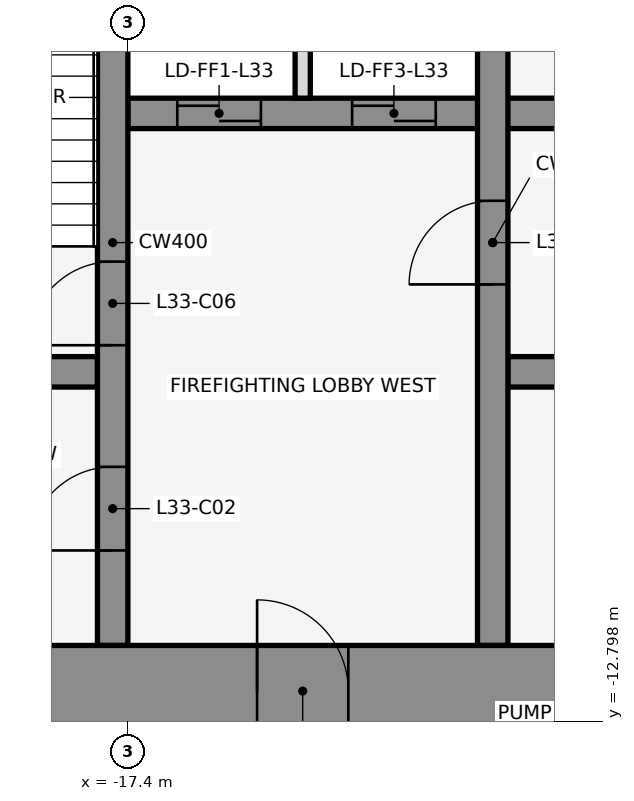
"""IFC4 building model, lengths in metres.
Left out: names, types, materials, properties, quantities, classifications, styles, units other than length and angle.
Written with IfcOpenShell. Run it as: python <this file> out.ifc"""

import sys

from ifc_helpers import new_model, si_unit, direction, frame, frame_2d, origin, place, context, subcontext, project, spatial, rectangle, extrude, element, fill, save


model = new_model("IFC4")
c1 = context("Model", 3, precision=1e-05, world=origin(), true_north=direction((0.0, 1.0)))
c2 = subcontext(c1, "Body", "Model", "MODEL_VIEW")
j1 = project(units=[si_unit("LENGTHUNIT", "METRE"), si_unit("PLANEANGLEUNIT", "RADIAN")], contexts=[c1])
p1 = place(None, origin())
s1 = spatial("IfcSite", under=j1, at=p1, CompositionType="ELEMENT")
p2 = place(p1, origin())
s2 = spatial("IfcBuilding", under=s1, at=p2, CompositionType="ELEMENT")
p3 = place(p2, frame((0.0, 0.0, 152.7)))
s3 = spatial("IfcBuildingStorey", under=s2, at=p3, CompositionType="ELEMENT", Elevation=152.7)
p4 = place(p3, frame((-20.8, -8.2, 0.0), z_axis=(0.0, 0.0, 1.0), x_axis=(1.0, 0.0, 0.0)))
e1 = element("IfcWall", 1, at=p4, inside=s3, PredefinedType="SHEAR", context=c2, shape_type="SweptSolid", body=[
    extrude(rectangle(XDim=3.0, YDim=0.4, at=frame_2d((1.5, 0.0))), origin(), (0.0, 0.0, 1.0), 4.1),
])
p5 = place(p4, frame((0.85, 0.0, 0.0)))
e2 = element("IfcOpeningElement", 2, at=p5, cuts=e1, PredefinedType="OPENING", context=c2, shape_type="SweptSolid", body=[
    extrude(rectangle(XDim=1.2, YDim=2.1, at=frame_2d((0.6, 1.05))), frame((0.0, 0.212, 0.0), z_axis=(0.0, -1.0, 0.0), x_axis=(1.0, 0.0, 0.0)), (0.0, 0.0, 1.0), 0.424),
])
p6 = place(p3, frame((-12.4, -8.2, 0.0), z_axis=(0.0, 0.0, 1.0), x_axis=(1.0, 0.0, 0.0)))
e3 = element("IfcWall", 3, at=p6, inside=s3, PredefinedType="SHEAR", context=c2, shape_type="SweptSolid", body=[
    extrude(rectangle(XDim=6.0, YDim=0.4, at=frame_2d((3.0, 0.0))), origin(), (0.0, 0.0, 1.0), 4.1),
])
p7 = place(p6, frame((3.65, 0.0, 0.0)))
e4 = element("IfcOpeningElement", 4, at=p7, cuts=e3, PredefinedType="OPENING", context=c2, shape_type="SweptSolid", body=[
    extrude(rectangle(XDim=1.2, YDim=2.1, at=frame_2d((0.6, 1.05))), frame((0.0, 0.212, 0.0), z_axis=(0.0, -1.0, 0.0), x_axis=(1.0, 0.0, 0.0)), (0.0, 0.0, 1.0), 0.424),
])
p8 = place(p6, frame((0.95, 0.0, 0.0)))
e5 = element("IfcOpeningElement", 5, at=p8, cuts=e3, PredefinedType="OPENING", context=c2, shape_type="SweptSolid", body=[
    extrude(rectangle(XDim=0.9, YDim=2.1, at=frame_2d((0.45, 1.05))), frame((0.0, 0.212, 0.0), z_axis=(0.0, -1.0, 0.0), x_axis=(1.0, 0.0, 0.0)), (0.0, 0.0, 1.0), 0.424),
])
p9 = place(p3, frame((-17.4, -4.8, 0.0), z_axis=(0.0, 0.0, 1.0), x_axis=(1.0, 0.0, 0.0)))
e6 = element("IfcWall", 6, at=p9, inside=s3, PredefinedType="SHEAR", context=c2, shape_type="SweptSolid", body=[
    extrude(rectangle(XDim=13.6, YDim=0.4, at=frame_2d((6.8, 0.0))), origin(), (0.0, 0.0, 1.0), 4.1),
])
p10 = place(p9, frame((0.65, 0.0, 0.0)))
e7 = element("IfcOpeningElement", 7, at=p10, cuts=e6, PredefinedType="OPENING", context=c2, shape_type="SweptSolid", body=[
    extrude(rectangle(XDim=1.1, YDim=2.1, at=frame_2d((0.55, 1.05))), frame((0.0, 0.212, 0.0), z_axis=(0.0, -1.0, 0.0), x_axis=(1.0, 0.0, 0.0)), (0.0, 0.0, 1.0), 0.424),
])
p11 = place(p9, frame((2.95, 0.0, 0.0)))
e8 = element("IfcOpeningElement", 8, at=p11, cuts=e6, PredefinedType="OPENING", context=c2, shape_type="SweptSolid", body=[
    extrude(rectangle(XDim=1.1, YDim=2.1, at=frame_2d((0.55, 1.05))), frame((0.0, 0.212, 0.0), z_axis=(0.0, -1.0, 0.0), x_axis=(1.0, 0.0, 0.0)), (0.0, 0.0, 1.0), 0.424),
])
p12 = place(p9, frame((8.75, 0.0, 0.0)))
e9 = element("IfcOpeningElement", 9, at=p12, cuts=e6, PredefinedType="OPENING", context=c2, shape_type="SweptSolid", body=[
    extrude(rectangle(XDim=0.9, YDim=2.1, at=frame_2d((0.45, 1.05))), frame((0.0, 0.212, 0.0), z_axis=(0.0, -1.0, 0.0), x_axis=(1.0, 0.0, 0.0)), (0.0, 0.0, 1.0), 0.424),
])
p13 = place(p3, frame((-17.6, -11.8, 0.0), z_axis=(0.0, 0.0, 1.0), x_axis=(0.0, 1.0, 0.0)))
e10 = element("IfcWall", 10, at=p13, inside=s3, PredefinedType="SHEAR", context=c2, shape_type="SweptSolid", body=[
    extrude(rectangle(XDim=10.6, YDim=0.4, at=frame_2d((5.3, 0.0))), origin(), (0.0, 0.0, 1.0), 4.1),
])
p14 = place(p13, frame((1.25, 0.0, 0.0)))
e11 = element("IfcOpeningElement", 11, at=p14, cuts=e10, PredefinedType="OPENING", context=c2, shape_type="SweptSolid", body=[
    extrude(rectangle(XDim=1.1, YDim=2.1, at=frame_2d((0.55, 1.05))), frame((0.0, 0.212, 0.0), z_axis=(0.0, -1.0, 0.0), x_axis=(1.0, 0.0, 0.0)), (0.0, 0.0, 1.0), 0.424),
])
p15 = place(p13, frame((3.95, 0.0, 0.0)))
e12 = element("IfcOpeningElement", 12, at=p15, cuts=e10, PredefinedType="OPENING", context=c2, shape_type="SweptSolid", body=[
    extrude(rectangle(XDim=1.1, YDim=2.1, at=frame_2d((0.55, 1.05))), frame((0.0, 0.212, 0.0), z_axis=(0.0, -1.0, 0.0), x_axis=(1.0, 0.0, 0.0)), (0.0, 0.0, 1.0), 0.424),
])
p16 = place(p3, frame((-15.1, -4.6, 0.0), z_axis=(0.0, 0.0, 1.0), x_axis=(0.0, 1.0, 0.0)))
e13 = element("IfcWall", 13, at=p16, inside=s3, PredefinedType="PARTITIONING", context=c2, shape_type="SweptSolid", body=[
    extrude(rectangle(XDim=3.4, YDim=0.2, at=frame_2d((1.7, 0.0))), origin(), (0.0, 0.0, 1.0), 2.84),
])
p17 = place(p3, frame((-12.6, -11.8, 0.0), z_axis=(0.0, 0.0, 1.0), x_axis=(0.0, 1.0, 0.0)))
e14 = element("IfcWall", 14, at=p17, inside=s3, PredefinedType="SHEAR", context=c2, shape_type="SweptSolid", body=[
    extrude(rectangle(XDim=10.6, YDim=0.4, at=frame_2d((5.3, 0.0))), origin(), (0.0, 0.0, 1.0), 4.1),
])
p18 = place(p17, frame((4.75, 0.0, 0.0)))
e15 = element("IfcOpeningElement", 15, at=p18, cuts=e14, PredefinedType="OPENING", context=c2, shape_type="SweptSolid", body=[
    extrude(rectangle(XDim=1.1, YDim=2.1, at=frame_2d((0.55, 1.05))), frame((0.0, 0.212, 0.0), z_axis=(0.0, -1.0, 0.0), x_axis=(1.0, 0.0, 0.0)), (0.0, 0.0, 1.0), 0.424),
])
p19 = place(p3, frame((-22.0, -12.4, 0.0), z_axis=(0.0, 0.0, 1.0), x_axis=(1.0, 0.0, 0.0)))
e16 = element("IfcWall", 16, at=p19, inside=s3, PredefinedType="SHEAR", context=c2, shape_type="SweptSolid", body=[
    extrude(rectangle(XDim=44.0, YDim=1.2, at=frame_2d((22.0, 0.0))), origin(), (0.0, 0.0, 1.0), 4.1),
])
p20 = place(p19, frame((2.2, 0.0, 0.0)))
e17 = element("IfcOpeningElement", 17, at=p20, cuts=e16, PredefinedType="OPENING", context=c2, shape_type="SweptSolid", body=[
    extrude(rectangle(XDim=1.2, YDim=2.1, at=frame_2d((0.6, 1.05))), frame((0.0, 0.612, 0.0), z_axis=(0.0, -1.0, 0.0), x_axis=(1.0, 0.0, 0.0)), (0.0, 0.0, 1.0), 1.224),
])
p21 = place(p19, frame((21.4, 0.0, 0.0)))
e18 = element("IfcOpeningElement", 18, at=p21, cuts=e16, PredefinedType="OPENING", context=c2, shape_type="SweptSolid", body=[
    extrude(rectangle(XDim=1.2, YDim=2.1, at=frame_2d((0.6, 1.05))), frame((0.0, 0.612, 0.0), z_axis=(0.0, -1.0, 0.0), x_axis=(1.0, 0.0, 0.0)), (0.0, 0.0, 1.0), 1.224),
])
p22 = place(p19, frame((40.6, 0.0, 0.0)))
e19 = element("IfcOpeningElement", 19, at=p22, cuts=e16, PredefinedType="OPENING", context=c2, shape_type="SweptSolid", body=[
    extrude(rectangle(XDim=1.2, YDim=2.1, at=frame_2d((0.6, 1.05))), frame((0.0, 0.612, 0.0), z_axis=(0.0, -1.0, 0.0), x_axis=(1.0, 0.0, 0.0)), (0.0, 0.0, 1.0), 1.224),
])
p23 = place(p19, frame((16.0, 0.0, 0.0)))
e20 = element("IfcOpeningElement", 20, at=p23, cuts=e16, PredefinedType="OPENING", context=c2, shape_type="SweptSolid", body=[
    extrude(rectangle(XDim=1.8, YDim=2.1, at=frame_2d((0.9, 1.05))), frame((0.0, 0.612, 0.0), z_axis=(0.0, -1.0, 0.0), x_axis=(1.0, 0.0, 0.0)), (0.0, 0.0, 1.0), 1.224),
])
p24 = place(p19, frame((6.3, 0.0, 0.0)))
e21 = element("IfcOpeningElement", 21, at=p24, cuts=e16, PredefinedType="OPENING", context=c2, shape_type="SweptSolid", body=[
    extrude(rectangle(XDim=1.2, YDim=2.1, at=frame_2d((0.6, 1.05))), frame((0.0, 0.612, 0.0), z_axis=(0.0, -1.0, 0.0), x_axis=(1.0, 0.0, 0.0)), (0.0, 0.0, 1.0), 1.224),
])
p25 = place(p19, frame((26.2, 0.0, 0.0)))
e22 = element("IfcOpeningElement", 22, at=p25, cuts=e16, PredefinedType="OPENING", context=c2, shape_type="SweptSolid", body=[
    extrude(rectangle(XDim=1.8, YDim=2.1, at=frame_2d((0.9, 1.05))), frame((0.0, 0.612, 0.0), z_axis=(0.0, -1.0, 0.0), x_axis=(1.0, 0.0, 0.0)), (0.0, 0.0, 1.0), 1.224),
])
p26 = place(p19, frame((36.5, 0.0, 0.0)))
e23 = element("IfcOpeningElement", 23, at=p26, cuts=e16, PredefinedType="OPENING", context=c2, shape_type="SweptSolid", body=[
    extrude(rectangle(XDim=1.2, YDim=2.1, at=frame_2d((0.6, 1.05))), frame((0.0, 0.612, 0.0), z_axis=(0.0, -1.0, 0.0), x_axis=(1.0, 0.0, 0.0)), (0.0, 0.0, 1.0), 1.224),
])
p27 = place(p14, frame((1.1, 0.0, 0.0), z_axis=(0.0, 0.0, 1.0), x_axis=(-1.0, 0.0, 0.0)))
e24 = element("IfcDoor", 24, at=p27, inside=s3, OperationType="SINGLE_SWING_LEFT", PredefinedType="DOOR", context=c2, shape_type="SweptSolid", body=[
    extrude(rectangle(XDim=1.1, YDim=2.1, at=frame_2d((0.55, 1.05))), frame((0.0, 0.025, 0.0), z_axis=(0.0, -1.0, 0.0), x_axis=(1.0, 0.0, 0.0)), (0.0, 0.0, 1.0), 0.05),
])
fill(e11, e24)
p28 = place(p10, origin())
e25 = element("IfcDoor", 25, at=p28, inside=s3, OperationType="DOUBLE_DOOR_SLIDING", PredefinedType="DOOR", context=c2, shape_type="SweptSolid", body=[
    extrude(rectangle(XDim=1.1, YDim=2.1, at=frame_2d((0.55, 1.05))), frame((0.0, 0.025, 0.0), z_axis=(0.0, -1.0, 0.0), x_axis=(1.0, 0.0, 0.0)), (0.0, 0.0, 1.0), 0.05),
])
fill(e7, e25)
p29 = place(p11, origin())
e26 = element("IfcDoor", 26, at=p29, inside=s3, OperationType="DOUBLE_DOOR_SLIDING", PredefinedType="DOOR", context=c2, shape_type="SweptSolid", body=[
    extrude(rectangle(XDim=1.1, YDim=2.1, at=frame_2d((0.55, 1.05))), frame((0.0, 0.025, 0.0), z_axis=(0.0, -1.0, 0.0), x_axis=(1.0, 0.0, 0.0)), (0.0, 0.0, 1.0), 0.05),
])
fill(e8, e26)
p30 = place(p15, frame((1.1, 0.0, 0.0), z_axis=(0.0, 0.0, 1.0), x_axis=(-1.0, 0.0, 0.0)))
e27 = element("IfcDoor", 27, at=p30, inside=s3, OperationType="SINGLE_SWING_LEFT", PredefinedType="DOOR", context=c2, shape_type="SweptSolid", body=[
    extrude(rectangle(XDim=1.1, YDim=2.1, at=frame_2d((0.55, 1.05))), frame((0.0, 0.025, 0.0), z_axis=(0.0, -1.0, 0.0), x_axis=(1.0, 0.0, 0.0)), (0.0, 0.0, 1.0), 0.05),
])
fill(e12, e27)
p31 = place(p18, origin())
e28 = element("IfcDoor", 28, at=p31, inside=s3, OperationType="SINGLE_SWING_LEFT", PredefinedType="DOOR", context=c2, shape_type="SweptSolid", body=[
    extrude(rectangle(XDim=1.1, YDim=2.1, at=frame_2d((0.55, 1.05))), frame((0.0, 0.025, 0.0), z_axis=(0.0, -1.0, 0.0), x_axis=(1.0, 0.0, 0.0)), (0.0, 0.0, 1.0), 0.05),
])
fill(e15, e28)
p32 = place(p24, frame((1.2, 0.0, 0.0), z_axis=(0.0, 0.0, 1.0), x_axis=(-1.0, 0.0, 0.0)))
e29 = element("IfcDoor", 29, at=p32, inside=s3, OperationType="SINGLE_SWING_RIGHT", PredefinedType="DOOR", context=c2, shape_type="SweptSolid", body=[
    extrude(rectangle(XDim=1.2, YDim=2.1, at=frame_2d((0.6, 1.05))), frame((0.0, 0.025, 0.0), z_axis=(0.0, -1.0, 0.0), x_axis=(1.0, 0.0, 0.0)), (0.0, 0.0, 1.0), 0.05),
])
fill(e21, e29)
save(model, sys.argv[1])
